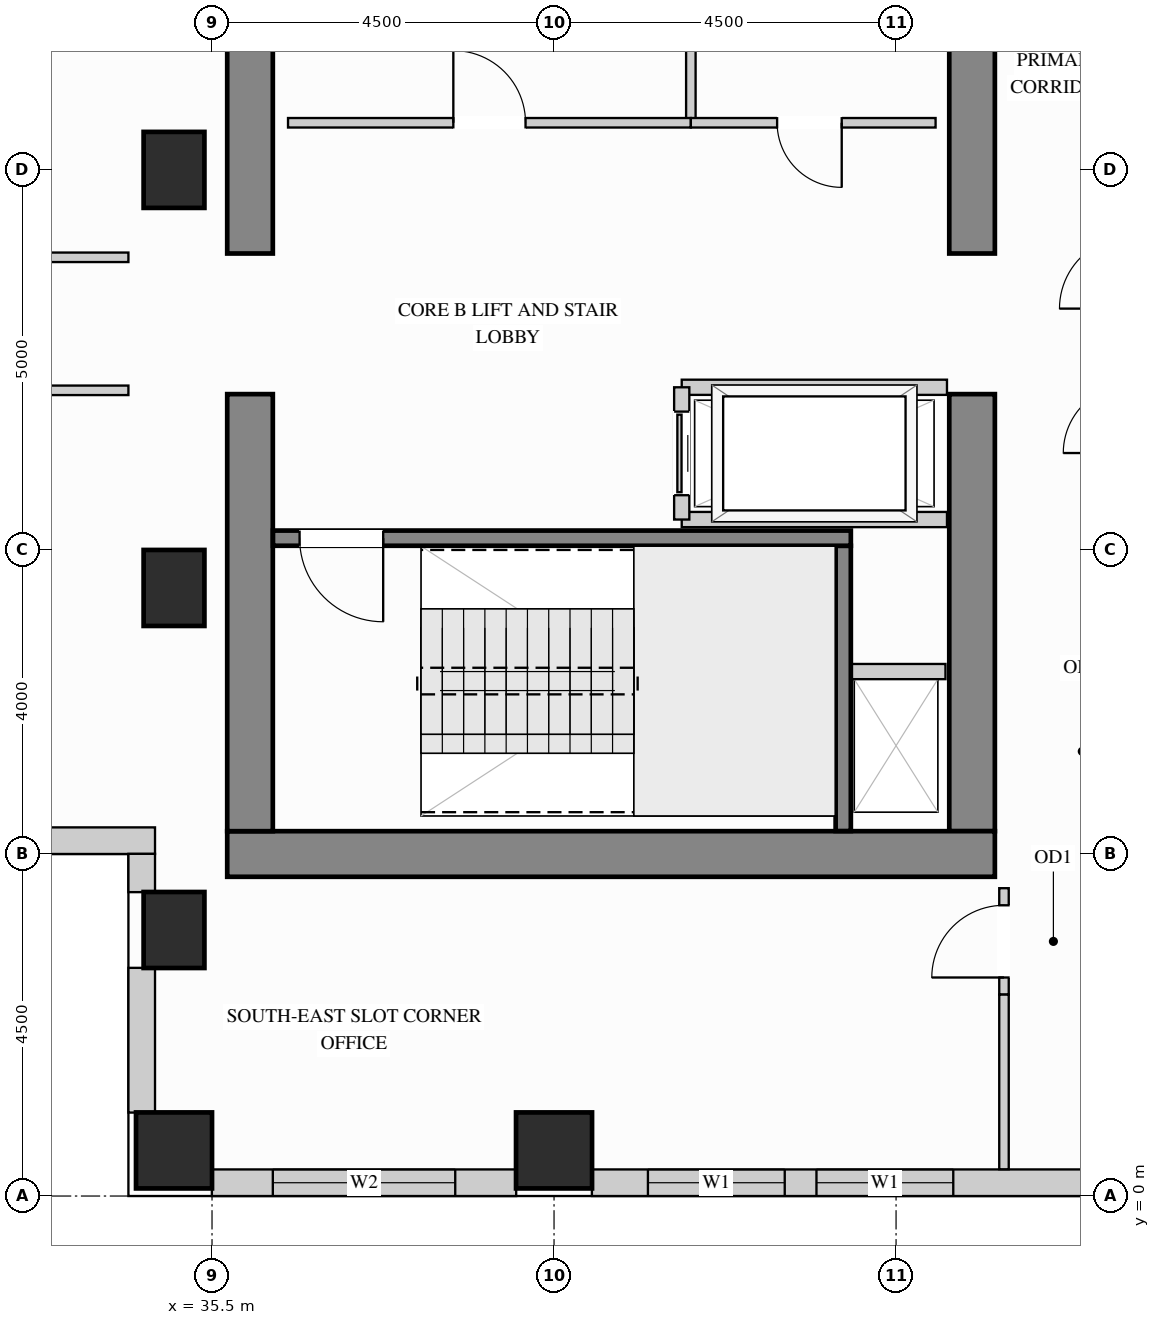
"""IFC4 building model, lengths in metres.
Left out: names, types, materials, properties, quantities, classifications, styles, units other than length and angle.
Written with IfcOpenShell. Run it as: python <this file> out.ifc"""

import sys

from ifc_helpers import new_model, si_unit, direction, frame, frame_2d, origin, origin_2d, place, context, subcontext, project, spatial, rectangle, extrude, source, transform, mapped, element, fill, save


model = new_model("IFC4")
c1 = context("Model", 3, precision=1e-05, world=origin(), true_north=direction((0.0, 1.0)))
c2 = subcontext(c1, "Body", "Model", "MODEL_VIEW")
j1 = project(units=[si_unit("LENGTHUNIT", "METRE"), si_unit("PLANEANGLEUNIT", "RADIAN")], contexts=[c1])
p1 = place(None, origin())
s1 = spatial("IfcSite", under=j1, at=p1, CompositionType="ELEMENT")
p2 = place(p1, origin())
s2 = spatial("IfcBuilding", under=s1, at=p2, CompositionType="ELEMENT")
p3 = place(p2, frame((0.0, 0.0, 143.1)))
s3 = spatial("IfcBuildingStorey", under=s2, at=p3, CompositionType="ELEMENT", Elevation=143.1)
m1 = source(origin(), c2, "Body", "SweptSolid", [
    extrude(rectangle(XDim=0.8, YDim=1.0, at=origin_2d()), origin(), (0.0, 0.0, 1.0), 3.4),
])
for number, where, z_axis, x_axis in (
    (1, (35.0, 13.5, 0.0), (0.0, 0.0, 1.0), (1.0, 0.0, 0.0)),
    (2, (35.0, 3.5, 0.0), (0.0, 0.0, 1.0), (1.0, 0.0, 0.0)),
    (3, (35.0, 8.0, 0.0), (0.0, 0.0, 1.0), (1.0, 0.0, 0.0)),
):
    element("IfcColumn", number, at=place(p3, frame(where, z_axis=z_axis, x_axis=x_axis)), inside=s3, PredefinedType="COLUMN", context=c2, shape_type="MappedRepresentation", body=[
        mapped(m1, transform((0.0, 0.0, 0.0), x_axis=(1.0, 0.0, 0.0), y_axis=(0.0, 1.0, 0.0), z_axis=(0.0, 0.0, 1.0))),
    ])
m2 = source(origin(), c2, "Body", "SweptSolid", [
    extrude(rectangle(XDim=1.0, YDim=1.0, at=origin_2d()), origin(), (0.0, 0.0, 1.0), 3.4),
])
for number, where, z_axis, x_axis in (
    (4, (35.0, 0.6, 0.0), (0.0, 0.0, 1.0), (1.0, 0.0, 0.0)),
    (5, (40.0, 0.6, 0.0), (0.0, 0.0, 1.0), (1.0, 0.0, 0.0)),
):
    element("IfcColumn", number, at=place(p3, frame(where, z_axis=z_axis, x_axis=x_axis)), inside=s3, PredefinedType="COLUMN", context=c2, shape_type="MappedRepresentation", body=[
        mapped(m2, transform((0.0, 0.0, 0.0), x_axis=(1.0, 0.0, 0.0), y_axis=(0.0, 1.0, 0.0), z_axis=(0.0, 0.0, 1.0))),
    ])
m3 = source(origin(), c2, "Body", "SweptSolid", [
    extrude(rectangle(XDim=5.75, YDim=0.6, at=frame_2d((2.875, 0.0))), origin(), (0.0, 0.0, 1.0), 3.4),
])
p4 = place(p3, frame((45.5, 4.8, 0.0), z_axis=(0.0, 0.0, 1.0), x_axis=(0.0, 1.0, 0.0)))
e6 = element("IfcWall", 6, at=p4, inside=s3, PredefinedType="SHEAR", context=c2, shape_type="MappedRepresentation", body=[
    mapped(m3, transform((0.0, 0.0, 0.0), x_axis=(1.0, 0.0, 0.0), y_axis=(0.0, 1.0, 0.0), z_axis=(0.0, 0.0, 1.0))),
])
m4 = source(origin(), c2, "Body", "SweptSolid", [
    extrude(rectangle(XDim=3.8, YDim=0.6, at=frame_2d((1.9, 0.0))), origin(), (0.0, 0.0, 1.0), 3.4),
])
p5 = place(p3, frame((45.5, 12.4, 0.0), z_axis=(0.0, 0.0, 1.0), x_axis=(0.0, 1.0, 0.0)))
e7 = element("IfcWall", 7, at=p5, inside=s3, PredefinedType="SHEAR", context=c2, shape_type="MappedRepresentation", body=[
    mapped(m4, transform((0.0, 0.0, 0.0), x_axis=(1.0, 0.0, 0.0), y_axis=(0.0, 1.0, 0.0), z_axis=(0.0, 0.0, 1.0))),
])
m5 = source(origin(), c2, "Body", "SweptSolid", [
    extrude(rectangle(XDim=10.1, YDim=0.6, at=frame_2d((5.05, 0.0))), origin(), (0.0, 0.0, 1.0), 3.4),
])
p6 = place(p3, frame((35.7, 4.5, 0.0), z_axis=(0.0, 0.0, 1.0), x_axis=(1.0, 0.0, 0.0)))
e8 = element("IfcWall", 8, at=p6, inside=s3, PredefinedType="SHEAR", context=c2, shape_type="MappedRepresentation", body=[
    mapped(m5, transform((0.0, 0.0, 0.0), x_axis=(1.0, 0.0, 0.0), y_axis=(0.0, 1.0, 0.0), z_axis=(0.0, 0.0, 1.0))),
])
p7 = place(p3, frame((36.0, 4.8, 0.0), z_axis=(0.0, 0.0, 1.0), x_axis=(0.0, 1.0, 0.0)))
e9 = element("IfcWall", 9, at=p7, inside=s3, PredefinedType="SHEAR", context=c2, shape_type="MappedRepresentation", body=[
    mapped(m3, transform((0.0, 0.0, 0.0), x_axis=(1.0, 0.0, 0.0), y_axis=(0.0, 1.0, 0.0), z_axis=(0.0, 0.0, 1.0))),
])
p8 = place(p3, frame((36.0, 12.4, 0.0), z_axis=(0.0, 0.0, 1.0), x_axis=(0.0, 1.0, 0.0)))
e10 = element("IfcWall", 10, at=p8, inside=s3, PredefinedType="SHEAR", context=c2, shape_type="MappedRepresentation", body=[
    mapped(m4, transform((0.0, 0.0, 0.0), x_axis=(1.0, 0.0, 0.0), y_axis=(0.0, 1.0, 0.0), z_axis=(0.0, 0.0, 1.0))),
])
p9 = place(p3, frame((19.15, 4.675, 0.0), z_axis=(0.0, 0.0, 1.0), x_axis=(1.0, 0.0, 0.0)))
e11 = element("IfcWall", 11, at=p9, inside=s3, PredefinedType="SOLIDWALL", context=c2, shape_type="SweptSolid", body=[
    extrude(rectangle(XDim=15.6, YDim=0.35, at=frame_2d((7.8, 0.0))), origin(), (0.0, 0.0, 1.0), 3.385),
])
p10 = place(p9, frame((4.307, 0.0, 0.78)))
e12 = element("IfcOpeningElement", 12, at=p10, cuts=e11, PredefinedType="OPENING", context=c2, shape_type="SweptSolid", body=[
    extrude(rectangle(XDim=1.5, YDim=2.0, at=frame_2d((0.75, 1.0))), frame((0.0, 0.185, 0.0), z_axis=(0.0, -1.0, 0.0), x_axis=(1.0, 0.0, 0.0)), (0.0, 0.0, 1.0), 0.37),
])
p11 = place(p9, frame((9.793, 0.0, 0.78)))
e13 = element("IfcOpeningElement", 13, at=p11, cuts=e11, PredefinedType="OPENING", context=c2, shape_type="SweptSolid", body=[
    extrude(rectangle(XDim=1.5, YDim=2.0, at=frame_2d((0.75, 1.0))), frame((0.0, 0.185, 0.0), z_axis=(0.0, -1.0, 0.0), x_axis=(1.0, 0.0, 0.0)), (0.0, 0.0, 1.0), 0.37),
])
m6 = source(origin(), c2, "Body", "SweptSolid", [
    extrude(rectangle(XDim=0.504, YDim=0.35, at=frame_2d((0.252, 0.0))), origin(), (0.0, 0.0, 1.0), 3.385),
])
p12 = place(p3, frame((34.575, 4.502, 0.0), z_axis=(0.0, 0.0, 1.0), x_axis=(0.0, -1.0, 0.0)))
e14 = element("IfcWall", 14, at=p12, inside=s3, PredefinedType="SOLIDWALL", context=c2, shape_type="MappedRepresentation", body=[
    mapped(m6, transform((0.0, 0.0, 0.0), x_axis=(1.0, 0.0, 0.0), y_axis=(0.0, 1.0, 0.0), z_axis=(0.0, 0.0, 1.0))),
])
m7 = source(origin(), c2, "Body", "SweptSolid", [
    extrude(rectangle(XDim=1.904, YDim=0.35, at=frame_2d((0.952, 0.0))), origin(), (0.0, 0.0, 1.0), 2.612),
])
p13 = place(p3, frame((34.575, 3.002, 0.0), z_axis=(0.0, 0.0, 1.0), x_axis=(0.0, -1.0, 0.0)))
e15 = element("IfcWall", 15, at=p13, inside=s3, PredefinedType="SOLIDWALL", context=c2, shape_type="MappedRepresentation", body=[
    mapped(m7, transform((0.0, 0.0, 0.0), x_axis=(1.0, 0.0, 0.0), y_axis=(0.0, 1.0, 0.0), z_axis=(0.0, 0.0, 1.0))),
])
p14 = place(p3, frame((35.498, 0.175, 0.0), z_axis=(0.0, 0.0, 1.0), x_axis=(1.0, 0.0, 0.0)))
e16 = element("IfcWall", 16, at=p14, inside=s3, PredefinedType="SOLIDWALL", context=c2, shape_type="SweptSolid", body=[
    extrude(rectangle(XDim=4.004, YDim=0.35, at=frame_2d((2.002, 0.0))), origin(), (0.0, 0.0, 1.0), 2.612),
])
p15 = place(p14, frame((0.802, 0.0, 0.78)))
e17 = element("IfcOpeningElement", 17, at=p15, cuts=e16, PredefinedType="OPENING", context=c2, shape_type="SweptSolid", body=[
    extrude(rectangle(XDim=2.4, YDim=1.652, at=frame_2d((1.2, 0.826))), frame((0.0, 0.185, 0.0), z_axis=(0.0, -1.0, 0.0), x_axis=(1.0, 0.0, 0.0)), (0.0, 0.0, 1.0), 0.37),
])
p16 = place(p3, frame((40.498, 0.175, 0.0), z_axis=(0.0, 0.0, 1.0), x_axis=(1.0, 0.0, 0.0)))
e18 = element("IfcWall", 18, at=p16, inside=s3, PredefinedType="SOLIDWALL", context=c2, shape_type="SweptSolid", body=[
    extrude(rectangle(XDim=6.604, YDim=0.35, at=frame_2d((3.302, 0.0))), origin(), (0.0, 0.0, 1.0), 2.612),
])
p17 = place(p16, frame((0.737, 0.0, 0.78)))
e19 = element("IfcOpeningElement", 19, at=p17, cuts=e18, PredefinedType="OPENING", context=c2, shape_type="SweptSolid", body=[
    extrude(rectangle(XDim=1.8, YDim=1.652, at=frame_2d((0.9, 0.826))), frame((0.0, 0.185, 0.0), z_axis=(0.0, -1.0, 0.0), x_axis=(1.0, 0.0, 0.0)), (0.0, 0.0, 1.0), 0.37),
])
p18 = place(p16, frame((2.955, 0.0, 0.78)))
e20 = element("IfcOpeningElement", 20, at=p18, cuts=e18, PredefinedType="OPENING", context=c2, shape_type="SweptSolid", body=[
    extrude(rectangle(XDim=1.8, YDim=1.652, at=frame_2d((0.9, 0.826))), frame((0.0, 0.185, 0.0), z_axis=(0.0, -1.0, 0.0), x_axis=(1.0, 0.0, 0.0)), (0.0, 0.0, 1.0), 0.37),
])
m8 = source(origin(), c2, "Body", "SweptSolid", [
    extrude(rectangle(XDim=1.93, YDim=0.125, at=frame_2d((0.965, 0.0))), origin(), (0.0, 0.0, 1.0), 3.385),
])
p19 = place(p3, frame((41.8, 14.12, 0.0), z_axis=(0.0, 0.0, 1.0), x_axis=(0.0, 1.0, 0.0)))
e21 = element("IfcWall", 21, at=p19, inside=s3, PredefinedType="PARTITIONING", context=c2, shape_type="MappedRepresentation", body=[
    mapped(m8, transform((0.0, 0.0, 0.0), x_axis=(1.0, 0.0, 0.0), y_axis=(0.0, 1.0, 0.0), z_axis=(0.0, 0.0, 1.0))),
])
p20 = place(p3, frame((36.5, 14.12, 0.0), z_axis=(0.0, 0.0, 1.0), x_axis=(1.0, 0.0, 0.0)))
e22 = element("IfcWall", 22, at=p20, inside=s3, PredefinedType="PARTITIONING", context=c2, shape_type="SweptSolid", body=[
    extrude(rectangle(XDim=5.3, YDim=0.125, at=frame_2d((2.65, 0.0))), origin(), (0.0, 0.0, 1.0), 3.385),
])
p21 = place(p20, frame((2.175, 0.0, 0.0)))
e23 = element("IfcOpeningElement", 23, at=p21, cuts=e22, PredefinedType="OPENING", context=c2, shape_type="SweptSolid", body=[
    extrude(rectangle(XDim=0.95, YDim=2.15, at=frame_2d((0.475, 1.075))), frame((0.0, 0.073, 0.0), z_axis=(0.0, -1.0, 0.0), x_axis=(1.0, 0.0, 0.0)), (0.0, 0.0, 1.0), 0.145),
])
p22 = place(p3, frame((41.8, 14.12, 0.0), z_axis=(0.0, 0.0, 1.0), x_axis=(1.0, 0.0, 0.0)))
e24 = element("IfcWall", 24, at=p22, inside=s3, PredefinedType="PARTITIONING", context=c2, shape_type="SweptSolid", body=[
    extrude(rectangle(XDim=3.22, YDim=0.125, at=frame_2d((1.61, 0.0))), origin(), (0.0, 0.0, 1.0), 3.385),
])
p23 = place(p22, frame((1.135, 0.0, 0.0)))
e25 = element("IfcOpeningElement", 25, at=p23, cuts=e24, PredefinedType="OPENING", context=c2, shape_type="SweptSolid", body=[
    extrude(rectangle(XDim=0.85, YDim=2.1, at=frame_2d((0.425, 1.05))), frame((0.0, 0.073, 0.0), z_axis=(0.0, -1.0, 0.0), x_axis=(1.0, 0.0, 0.0)), (0.0, 0.0, 1.0), 0.145),
])
p24 = place(p3, frame((45.92, 2.65, 0.0), z_axis=(0.0, 0.0, 1.0), x_axis=(0.0, 1.0, 0.0)))
e26 = element("IfcWall", 26, at=p24, inside=s3, PredefinedType="PARTITIONING", context=c2, shape_type="SweptSolid", body=[
    extrude(rectangle(XDim=1.4, YDim=0.125, at=frame_2d((0.7, 0.0))), origin(), (0.0, 0.0, 1.0), 3.385),
])
p25 = place(p24, frame((0.225, 0.0, 0.0)))
e27 = element("IfcOpeningElement", 27, at=p25, cuts=e26, PredefinedType="OPENING", context=c2, shape_type="SweptSolid", body=[
    extrude(rectangle(XDim=0.95, YDim=2.15, at=frame_2d((0.475, 1.075))), frame((0.0, 0.073, 0.0), z_axis=(0.0, -1.0, 0.0), x_axis=(1.0, 0.0, 0.0)), (0.0, 0.0, 1.0), 0.145),
])
m9 = source(origin(), c2, "Body", "SweptSolid", [
    extrude(rectangle(XDim=2.298, YDim=0.125, at=frame_2d((1.149, 0.0))), origin(), (0.0, 0.0, 1.0), 3.385),
])
p26 = place(p3, frame((45.92, 0.352, 0.0), z_axis=(0.0, 0.0, 1.0), x_axis=(0.0, 1.0, 0.0)))
e28 = element("IfcWall", 28, at=p26, inside=s3, PredefinedType="PARTITIONING", context=c2, shape_type="MappedRepresentation", body=[
    mapped(m9, transform((0.0, 0.0, 0.0), x_axis=(1.0, 0.0, 0.0), y_axis=(0.0, 1.0, 0.0), z_axis=(0.0, 0.0, 1.0))),
])
p27 = place(p3, frame((29.85, 12.35, 0.0), z_axis=(0.0, 0.0, 1.0), x_axis=(1.0, 0.0, 0.0)))
e29 = element("IfcWall", 29, at=p27, inside=s3, PredefinedType="PARTITIONING", context=c2, shape_type="SweptSolid", body=[
    extrude(rectangle(XDim=4.55, YDim=0.125, at=frame_2d((2.275, 0.0))), origin(), (0.0, 0.0, 1.0), 3.385),
])
p28 = place(p27, frame((1.8, 0.0, 0.0)))
e30 = element("IfcOpeningElement", 30, at=p28, cuts=e29, PredefinedType="OPENING", context=c2, shape_type="SweptSolid", body=[
    extrude(rectangle(XDim=0.95, YDim=2.15, at=frame_2d((0.475, 1.075))), frame((0.0, 0.073, 0.0), z_axis=(0.0, -1.0, 0.0), x_axis=(1.0, 0.0, 0.0)), (0.0, 0.0, 1.0), 0.145),
])
p29 = place(p3, frame((19.5, 10.6, 0.0), z_axis=(0.0, 0.0, 1.0), x_axis=(1.0, 0.0, 0.0)))
e31 = element("IfcWall", 31, at=p29, inside=s3, PredefinedType="PARTITIONING", context=c2, shape_type="SweptSolid", body=[
    extrude(rectangle(XDim=14.9, YDim=0.125, at=frame_2d((7.45, 0.0))), origin(), (0.0, 0.0, 1.0), 3.385),
])
p30 = place(p29, frame((6.975, 0.0, 0.0)))
e32 = element("IfcOpeningElement", 32, at=p30, cuts=e31, PredefinedType="OPENING", context=c2, shape_type="SweptSolid", body=[
    extrude(rectangle(XDim=0.95, YDim=2.15, at=frame_2d((0.475, 1.075))), frame((0.0, 0.073, 0.0), z_axis=(0.0, -1.0, 0.0), x_axis=(1.0, 0.0, 0.0)), (0.0, 0.0, 1.0), 0.145),
])
m10 = source(origin(), c2, "Body", "SweptSolid", [
    extrude(rectangle(XDim=1.3, YDim=0.2, at=frame_2d((0.65, 0.0))), origin(), (0.0, 0.0, 1.0), 3.385),
])
p31 = place(p3, frame((43.85, 6.9, 0.0), z_axis=(0.0, 0.0, 1.0), x_axis=(1.0, 0.0, 0.0)))
e33 = element("IfcWall", 33, at=p31, inside=s3, PredefinedType="PARTITIONING", context=c2, shape_type="MappedRepresentation", body=[
    mapped(m10, transform((0.0, 0.0, 0.0), x_axis=(1.0, 0.0, 0.0), y_axis=(0.0, 1.0, 0.0), z_axis=(0.0, 0.0, 1.0))),
])
m11 = source(origin(), c2, "Body", "SweptSolid", [
    extrude(rectangle(XDim=3.49, YDim=0.2, at=frame_2d((1.745, 0.0))), origin(), (0.0, 0.0, 1.0), 3.385),
])
for number, where, z_axis, x_axis in (
    (34, (41.68, 10.64, 0.0), (0.0, 0.0, 1.0), (1.0, 0.0, 0.0)),
    (35, (41.68, 8.9, 0.0), (0.0, 0.0, 1.0), (1.0, 0.0, 0.0)),
):
    element("IfcWall", number, at=place(p3, frame(where, z_axis=z_axis, x_axis=x_axis)), inside=s3, PredefinedType="PARTITIONING", context=c2, shape_type="MappedRepresentation", body=[
        mapped(m11, transform((0.0, 0.0, 0.0), x_axis=(1.0, 0.0, 0.0), y_axis=(0.0, 1.0, 0.0), z_axis=(0.0, 0.0, 1.0))),
    ])
p32 = place(p3, frame((41.68, 8.9, 0.0), z_axis=(0.0, 0.0, 1.0), x_axis=(0.0, 1.0, 0.0)))
e36 = element("IfcWall", 36, at=p32, inside=s3, PredefinedType="PARTITIONING", context=c2, shape_type="SweptSolid", body=[
    extrude(rectangle(XDim=1.74, YDim=0.2, at=frame_2d((0.87, 0.0))), origin(), (0.0, 0.0, 1.0), 3.385),
])
p33 = place(p32, frame((0.32, 0.0, 0.0)))
e37 = element("IfcOpeningElement", 37, at=p33, cuts=e36, PredefinedType="OPENING", context=c2, shape_type="SweptSolid", body=[
    extrude(rectangle(XDim=1.1, YDim=2.2, at=frame_2d((0.55, 1.1))), frame((0.0, 0.11, 0.0), z_axis=(0.0, -1.0, 0.0), x_axis=(1.0, 0.0, 0.0)), (0.0, 0.0, 1.0), 0.22),
])
m12 = source(origin(), c2, "Body", "SweptSolid", [
    extrude(rectangle(XDim=3.753, YDim=0.2, at=frame_2d((1.876, 0.0))), origin(), (0.0, 0.0, 1.0), 3.4),
])
p34 = place(p3, frame((43.805, 4.802, 0.0), z_axis=(0.0, 0.0, 1.0), x_axis=(0.0, 1.0, 0.0)))
e38 = element("IfcWall", 38, at=p34, inside=s3, PredefinedType="SHEAR", context=c2, shape_type="MappedRepresentation", body=[
    mapped(m12, transform((0.0, 0.0, 0.0), x_axis=(1.0, 0.0, 0.0), y_axis=(0.0, 1.0, 0.0), z_axis=(0.0, 0.0, 1.0))),
])
p35 = place(p3, frame((36.302, 8.655, 0.0), z_axis=(0.0, 0.0, 1.0), x_axis=(1.0, 0.0, 0.0)))
e39 = element("IfcWall", 39, at=p35, inside=s3, PredefinedType="SHEAR", context=c2, shape_type="SweptSolid", body=[
    extrude(rectangle(XDim=7.603, YDim=0.2, at=frame_2d((3.802, 0.0))), origin(), (0.0, 0.0, 1.0), 3.4),
])
p36 = place(p35, frame((0.35, 0.0, 0.0)))
e40 = element("IfcOpeningElement", 40, at=p36, cuts=e39, PredefinedType="OPENING", context=c2, shape_type="SweptSolid", body=[
    extrude(rectangle(XDim=1.1, YDim=2.15, at=frame_2d((0.55, 1.075))), frame((0.0, 0.11, 0.0), z_axis=(0.0, -1.0, 0.0), x_axis=(1.0, 0.0, 0.0)), (0.0, 0.0, 1.0), 0.22),
])
m13 = source(origin(), c2, "Body", "SweptSolid", [
    extrude(rectangle(XDim=1.1, YDim=2.2, at=frame_2d((0.55, 1.1))), frame((0.0, 0.025, 0.0), z_axis=(0.0, -1.0, 0.0), x_axis=(1.0, 0.0, 0.0)), (0.0, 0.0, 1.0), 0.05),
])
p37 = place(p33, origin())
e41 = element("IfcDoor", 41, at=p37, inside=s3, OperationType="SLIDING_TO_LEFT", PredefinedType="DOOR", context=c2, shape_type="MappedRepresentation", body=[
    mapped(m13, transform((0.0, 0.0, 0.0), x_axis=(1.0, 0.0, 0.0), y_axis=(0.0, 1.0, 0.0), z_axis=(0.0, 0.0, 1.0))),
])
fill(e37, e41)
m14 = source(origin(), c2, "Body", "SweptSolid", [
    extrude(rectangle(XDim=0.95, YDim=2.15, at=frame_2d((0.475, 1.075))), frame((0.0, 0.025, 0.0), z_axis=(0.0, -1.0, 0.0), x_axis=(1.0, 0.0, 0.0)), (0.0, 0.0, 1.0), 0.05),
])
p38 = place(p21, origin())
e42 = element("IfcDoor", 42, at=p38, inside=s3, OperationType="SINGLE_SWING_LEFT", PredefinedType="DOOR", context=c2, shape_type="MappedRepresentation", body=[
    mapped(m14, transform((0.0, 0.0, 0.0), x_axis=(1.0, 0.0, 0.0), y_axis=(0.0, 1.0, 0.0), z_axis=(0.0, 0.0, 1.0))),
])
fill(e23, e42)
p39 = place(p25, origin())
e43 = element("IfcDoor", 43, at=p39, inside=s3, OperationType="SINGLE_SWING_LEFT", PredefinedType="DOOR", context=c2, shape_type="MappedRepresentation", body=[
    mapped(m14, transform((0.0, 0.0, 0.0), x_axis=(1.0, 0.0, 0.0), y_axis=(0.0, 1.0, 0.0), z_axis=(0.0, 0.0, 1.0))),
])
fill(e27, e43)
m15 = source(origin(), c2, "Body", "SweptSolid", [
    extrude(rectangle(XDim=0.85, YDim=2.1, at=frame_2d((0.425, 1.05))), frame((0.0, 0.025, 0.0), z_axis=(0.0, -1.0, 0.0), x_axis=(1.0, 0.0, 0.0)), (0.0, 0.0, 1.0), 0.05),
])
p40 = place(p23, origin())
e44 = element("IfcDoor", 44, at=p40, inside=s3, OperationType="SINGLE_SWING_RIGHT", PredefinedType="DOOR", context=c2, shape_type="MappedRepresentation", body=[
    mapped(m15, transform((0.0, 0.0, 0.0), x_axis=(1.0, 0.0, 0.0), y_axis=(0.0, 1.0, 0.0), z_axis=(0.0, 0.0, 1.0))),
])
fill(e25, e44)
m16 = source(origin(), c2, "Body", "SweptSolid", [
    extrude(rectangle(XDim=1.1, YDim=2.15, at=frame_2d((0.55, 1.075))), frame((0.0, 0.025, 0.0), z_axis=(0.0, -1.0, 0.0), x_axis=(1.0, 0.0, 0.0)), (0.0, 0.0, 1.0), 0.05),
])
p41 = place(p36, origin())
e45 = element("IfcDoor", 45, at=p41, inside=s3, OperationType="SINGLE_SWING_RIGHT", PredefinedType="DOOR", context=c2, shape_type="MappedRepresentation", body=[
    mapped(m16, transform((0.0, 0.0, 0.0), x_axis=(1.0, 0.0, 0.0), y_axis=(0.0, 1.0, 0.0), z_axis=(0.0, 0.0, 1.0))),
])
fill(e40, e45)
m17 = source(origin(), c2, "Body", "SweptSolid", [
    extrude(rectangle(XDim=1.8, YDim=1.652, at=frame_2d((0.9, 0.826))), frame((0.0, 0.03, 0.0), z_axis=(0.0, -1.0, 0.0), x_axis=(1.0, 0.0, 0.0)), (0.0, 0.0, 1.0), 0.06),
])
p42 = place(p17, origin())
e46 = element("IfcWindow", 46, at=p42, inside=s3, PartitioningType="SINGLE_PANEL", PredefinedType="WINDOW", context=c2, shape_type="MappedRepresentation", body=[
    mapped(m17, transform((0.0, 0.0, 0.0), x_axis=(1.0, 0.0, 0.0), y_axis=(0.0, 1.0, 0.0), z_axis=(0.0, 0.0, 1.0))),
])
fill(e19, e46)
p43 = place(p18, origin())
e47 = element("IfcWindow", 47, at=p43, inside=s3, PartitioningType="SINGLE_PANEL", PredefinedType="WINDOW", context=c2, shape_type="MappedRepresentation", body=[
    mapped(m17, transform((0.0, 0.0, 0.0), x_axis=(1.0, 0.0, 0.0), y_axis=(0.0, 1.0, 0.0), z_axis=(0.0, 0.0, 1.0))),
])
fill(e20, e47)
m18 = source(origin(), c2, "Body", "SweptSolid", [
    extrude(rectangle(XDim=2.4, YDim=1.652, at=frame_2d((1.2, 0.826))), frame((0.0, 0.03, 0.0), z_axis=(0.0, -1.0, 0.0), x_axis=(1.0, 0.0, 0.0)), (0.0, 0.0, 1.0), 0.06),
])
p44 = place(p15, origin())
e48 = element("IfcWindow", 48, at=p44, inside=s3, PartitioningType="SINGLE_PANEL", PredefinedType="WINDOW", context=c2, shape_type="MappedRepresentation", body=[
    mapped(m18, transform((0.0, 0.0, 0.0), x_axis=(1.0, 0.0, 0.0), y_axis=(0.0, 1.0, 0.0), z_axis=(0.0, 0.0, 1.0))),
])
fill(e17, e48)
save(model, sys.argv[1])
